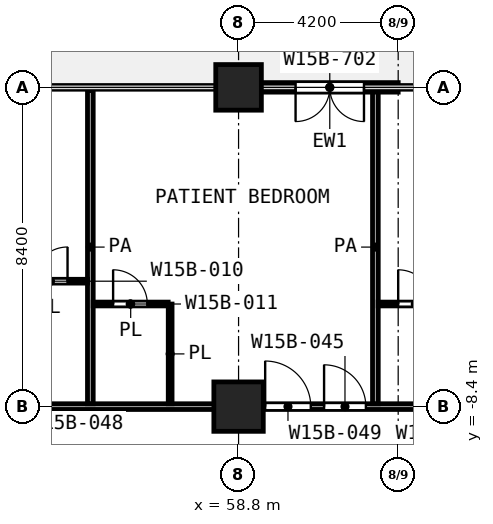
"""IFC4 building model, lengths in metres.
Left out: names, types, materials, properties, quantities, classifications, styles, units other than length and angle.
Written with IfcOpenShell. Run it as: python <this file> out.ifc"""

import sys

from ifc_helpers import new_model, si_unit, direction, frame, frame_2d, origin, origin_2d, place, context, subcontext, project, spatial, rectangle, extrude, element, fill, save


model = new_model("IFC4")
c1 = context("Model", 3, precision=1e-05, world=origin(), true_north=direction((0.0, 1.0)))
c2 = subcontext(c1, "Body", "Model", "MODEL_VIEW")
j1 = project(units=[si_unit("LENGTHUNIT", "METRE"), si_unit("PLANEANGLEUNIT", "RADIAN")], contexts=[c1])
p1 = place(None, origin())
s1 = spatial("IfcSite", under=j1, at=p1, CompositionType="ELEMENT")
p2 = place(p1, origin())
s2 = spatial("IfcBuilding", under=s1, at=p2, CompositionType="ELEMENT")
p3 = place(p2, frame((0.0, 0.0, 85.4)))
s3 = spatial("IfcBuildingStorey", under=s2, at=p3, CompositionType="ELEMENT", Elevation=85.4)
p4 = place(p3, frame((58.8, 0.0, 0.0), z_axis=(0.0, 0.0, 1.0), x_axis=(1.0, 0.0, 0.0)))
e1 = element("IfcColumn", 1, at=p4, inside=s3, PredefinedType="COLUMN", context=c2, shape_type="SweptSolid", body=[
    extrude(rectangle(XDim=1.2, YDim=1.2, at=origin_2d()), origin(), (0.0, 0.0, 1.0), 4.2),
])
p5 = place(p3, frame((58.8, -8.4, 0.0), z_axis=(0.0, 0.0, 1.0), x_axis=(1.0, 0.0, 0.0)))
e2 = element("IfcColumn", 2, at=p5, inside=s3, PredefinedType="COLUMN", context=c2, shape_type="SweptSolid", body=[
    extrude(rectangle(XDim=1.3, YDim=1.3, at=origin_2d()), origin(), (0.0, 0.0, 1.0), 4.2),
])
p6 = place(p3, frame((63.0, 0.0, 0.0), z_axis=(0.0, 0.0, 1.0), x_axis=(-1.0, 0.0, 0.0)))
e3 = element("IfcWall", 3, at=p6, inside=s3, PredefinedType="SOLIDWALL", context=c2, shape_type="SweptSolid", body=[
    extrude(rectangle(XDim=3.6, YDim=0.25, at=frame_2d((1.8, 0.0))), origin(), (0.0, 0.0, 1.0), 3.78),
])
p7 = place(p6, frame((0.9, 0.0, 0.0)))
e4 = element("IfcOpeningElement", 4, at=p7, cuts=e3, PredefinedType="OPENING", context=c2, shape_type="SweptSolid", body=[
    extrude(rectangle(XDim=1.8, YDim=2.1, at=frame_2d((0.9, 1.05))), frame((0.0, 0.135, 0.0), z_axis=(0.0, -1.0, 0.0), x_axis=(1.0, 0.0, 0.0)), (0.0, 0.0, 1.0), 0.27),
])
p8 = place(p3, frame((54.975, -5.7, 0.0), z_axis=(0.0, 0.0, 1.0), x_axis=(1.0, 0.0, 0.0)))
e5 = element("IfcWall", 5, at=p8, inside=s3, PredefinedType="PARTITIONING", context=c2, shape_type="SweptSolid", body=[
    extrude(rectangle(XDim=1.973, YDim=0.1, at=frame_2d((0.986, 0.0))), origin(), (0.0, 0.0, 1.0), 3.9),
])
p9 = place(p8, frame((0.524, 0.0, 0.0)))
e6 = element("IfcOpeningElement", 6, at=p9, cuts=e5, PredefinedType="OPENING", context=c2, shape_type="SweptSolid", body=[
    extrude(rectangle(XDim=0.9, YDim=2.1, at=frame_2d((0.45, 1.05))), frame((0.0, 0.06, 0.0), z_axis=(0.0, -1.0, 0.0), x_axis=(1.0, 0.0, 0.0)), (0.0, 0.0, 1.0), 0.12),
])
p10 = place(p3, frame((62.475, -5.7, 0.0), z_axis=(0.0, 0.0, 1.0), x_axis=(1.0, 0.0, 0.0)))
e7 = element("IfcWall", 7, at=p10, inside=s3, PredefinedType="PARTITIONING", context=c2, shape_type="SweptSolid", body=[
    extrude(rectangle(XDim=1.975, YDim=0.1, at=frame_2d((0.987, 0.0))), origin(), (0.0, 0.0, 1.0), 3.9),
])
p11 = place(p10, frame((0.525, 0.0, 0.0)))
e8 = element("IfcOpeningElement", 8, at=p11, cuts=e7, PredefinedType="OPENING", context=c2, shape_type="SweptSolid", body=[
    extrude(rectangle(XDim=0.9, YDim=2.1, at=frame_2d((0.45, 1.05))), frame((0.0, 0.06, 0.0), z_axis=(0.0, -1.0, 0.0), x_axis=(1.0, 0.0, 0.0)), (0.0, 0.0, 1.0), 0.12),
])
p12 = place(p3, frame((52.85, -5.1, 0.0), z_axis=(0.0, 0.0, 1.0), x_axis=(1.0, 0.0, 0.0)))
e9 = element("IfcWall", 9, at=p12, inside=s3, PredefinedType="PARTITIONING", context=c2, shape_type="SweptSolid", body=[
    extrude(rectangle(XDim=1.975, YDim=0.1, at=frame_2d((0.987, 0.0))), origin(), (0.0, 0.0, 1.0), 3.9),
])
p13 = place(p12, frame((0.55, 0.0, 0.0)))
e10 = element("IfcOpeningElement", 10, at=p13, cuts=e9, PredefinedType="OPENING", context=c2, shape_type="SweptSolid", body=[
    extrude(rectangle(XDim=0.9, YDim=2.1, at=frame_2d((0.45, 1.05))), frame((0.0, 0.06, 0.0), z_axis=(0.0, -1.0, 0.0), x_axis=(1.0, 0.0, 0.0)), (0.0, 0.0, 1.0), 0.12),
])
p14 = place(p3, frame((57.0, -8.325, 0.0), z_axis=(0.0, 0.0, 1.0), x_axis=(0.0, 1.0, 0.0)))
e11 = element("IfcWall", 11, at=p14, inside=s3, PredefinedType="PARTITIONING", context=c2, shape_type="SweptSolid", body=[
    extrude(rectangle(XDim=2.624, YDim=0.1, at=frame_2d((1.312, 0.0))), origin(), (0.0, 0.0, 1.0), 3.9),
])
p15 = place(p3, frame((51.0, -8.4, 0.0), z_axis=(0.0, 0.0, 1.0), x_axis=(1.0, 0.0, 0.0)))
e12 = element("IfcWall", 12, at=p15, inside=s3, PredefinedType="PARTITIONING", context=c2, shape_type="SweptSolid", body=[
    extrude(rectangle(XDim=28.72, YDim=0.15, at=frame_2d((14.36, 0.0))), origin(), (0.0, 0.0, 1.0), 3.9),
])
p16 = place(p15, frame((8.5, 0.0, 0.0)))
e13 = element("IfcOpeningElement", 13, at=p16, cuts=e12, PredefinedType="OPENING", context=c2, shape_type="SweptSolid", body=[
    extrude(rectangle(XDim=1.2, YDim=2.1, at=frame_2d((0.6, 1.05))), frame((0.0, 0.085, 0.0), z_axis=(0.0, -1.0, 0.0), x_axis=(1.0, 0.0, 0.0)), (0.0, 0.0, 1.0), 0.17),
])
p17 = place(p15, frame((10.05, 0.0, 0.0)))
e14 = element("IfcOpeningElement", 14, at=p17, cuts=e12, PredefinedType="OPENING", context=c2, shape_type="SweptSolid", body=[
    extrude(rectangle(XDim=1.1, YDim=2.1, at=frame_2d((0.55, 1.05))), frame((0.0, 0.085, 0.0), z_axis=(0.0, -1.0, 0.0), x_axis=(1.0, 0.0, 0.0)), (0.0, 0.0, 1.0), 0.17),
])
p18 = place(p15, frame((13.8, 0.0, 0.0)))
e15 = element("IfcOpeningElement", 15, at=p18, cuts=e12, PredefinedType="OPENING", context=c2, shape_type="SweptSolid", body=[
    extrude(rectangle(XDim=1.2, YDim=2.1, at=frame_2d((0.6, 1.05))), frame((0.0, 0.085, 0.0), z_axis=(0.0, -1.0, 0.0), x_axis=(1.0, 0.0, 0.0)), (0.0, 0.0, 1.0), 0.17),
])
p19 = place(p15, frame((16.9, 0.0, 0.0)))
e16 = element("IfcOpeningElement", 16, at=p19, cuts=e12, PredefinedType="OPENING", context=c2, shape_type="SweptSolid", body=[
    extrude(rectangle(XDim=1.2, YDim=2.1, at=frame_2d((0.6, 1.05))), frame((0.0, 0.085, 0.0), z_axis=(0.0, -1.0, 0.0), x_axis=(1.0, 0.0, 0.0)), (0.0, 0.0, 1.0), 0.17),
])
p20 = place(p15, frame((22.35, 0.0, 0.0)))
e17 = element("IfcOpeningElement", 17, at=p20, cuts=e12, PredefinedType="OPENING", context=c2, shape_type="SweptSolid", body=[
    extrude(rectangle(XDim=1.5, YDim=2.1, at=frame_2d((0.75, 1.05))), frame((0.0, 0.085, 0.0), z_axis=(0.0, -1.0, 0.0), x_axis=(1.0, 0.0, 0.0)), (0.0, 0.0, 1.0), 0.17),
])
for number, where, z_axis, x_axis in (
    (18, (54.9, -8.325, 0.0), (0.0, 0.0, 1.0), (0.0, 1.0, 0.0)),
    (19, (62.4, -8.325, 0.0), (0.0, 0.0, 1.0), (0.0, 1.0, 0.0)),
):
    element("IfcWall", number, at=place(p3, frame(where, z_axis=z_axis, x_axis=x_axis)), inside=s3, PredefinedType="PARTITIONING", context=c2, shape_type="SweptSolid", body=[
        extrude(rectangle(XDim=8.245, YDim=0.15, at=frame_2d((4.123, 0.0))), origin(), (0.0, 0.0, 1.0), 3.9),
    ])
p21 = place(p7, origin())
e20 = element("IfcDoor", 20, at=p21, inside=s3, OperationType="DOUBLE_DOOR_SINGLE_SWING", PredefinedType="DOOR", context=c2, shape_type="SweptSolid", body=[
    extrude(rectangle(XDim=1.8, YDim=2.1, at=frame_2d((0.9, 1.05))), frame((0.0, 0.025, 0.0), z_axis=(0.0, -1.0, 0.0), x_axis=(1.0, 0.0, 0.0)), (0.0, 0.0, 1.0), 0.05),
])
fill(e4, e20)
p22 = place(p13, origin())
e21 = element("IfcDoor", 21, at=p22, inside=s3, OperationType="SINGLE_SWING_RIGHT", PredefinedType="DOOR", context=c2, shape_type="SweptSolid", body=[
    extrude(rectangle(XDim=0.9, YDim=2.1, at=frame_2d((0.45, 1.05))), frame((0.0, 0.025, 0.0), z_axis=(0.0, -1.0, 0.0), x_axis=(1.0, 0.0, 0.0)), (0.0, 0.0, 1.0), 0.05),
])
fill(e10, e21)
p23 = place(p16, origin())
e22 = element("IfcDoor", 22, at=p23, inside=s3, OperationType="SINGLE_SWING_LEFT", PredefinedType="DOOR", context=c2, shape_type="SweptSolid", body=[
    extrude(rectangle(XDim=1.2, YDim=2.1, at=frame_2d((0.6, 1.05))), frame((0.0, 0.025, 0.0), z_axis=(0.0, -1.0, 0.0), x_axis=(1.0, 0.0, 0.0)), (0.0, 0.0, 1.0), 0.05),
])
fill(e13, e22)
p24 = place(p17, origin())
e23 = element("IfcDoor", 23, at=p24, inside=s3, OperationType="SINGLE_SWING_LEFT", PredefinedType="DOOR", context=c2, shape_type="SweptSolid", body=[
    extrude(rectangle(XDim=1.1, YDim=2.1, at=frame_2d((0.55, 1.05))), frame((0.0, 0.025, 0.0), z_axis=(0.0, -1.0, 0.0), x_axis=(1.0, 0.0, 0.0)), (0.0, 0.0, 1.0), 0.05),
])
fill(e14, e23)
p25 = place(p9, origin())
e24 = element("IfcDoor", 24, at=p25, inside=s3, OperationType="SINGLE_SWING_LEFT", PredefinedType="DOOR", context=c2, shape_type="SweptSolid", body=[
    extrude(rectangle(XDim=0.9, YDim=2.1, at=frame_2d((0.45, 1.05))), frame((0.0, 0.025, 0.0), z_axis=(0.0, -1.0, 0.0), x_axis=(1.0, 0.0, 0.0)), (0.0, 0.0, 1.0), 0.05),
])
fill(e6, e24)
p26 = place(p11, origin())
e25 = element("IfcDoor", 25, at=p26, inside=s3, OperationType="SINGLE_SWING_LEFT", PredefinedType="DOOR", context=c2, shape_type="SweptSolid", body=[
    extrude(rectangle(XDim=0.9, YDim=2.1, at=frame_2d((0.45, 1.05))), frame((0.0, 0.025, 0.0), z_axis=(0.0, -1.0, 0.0), x_axis=(1.0, 0.0, 0.0)), (0.0, 0.0, 1.0), 0.05),
])
fill(e8, e25)
save(model, sys.argv[1])
